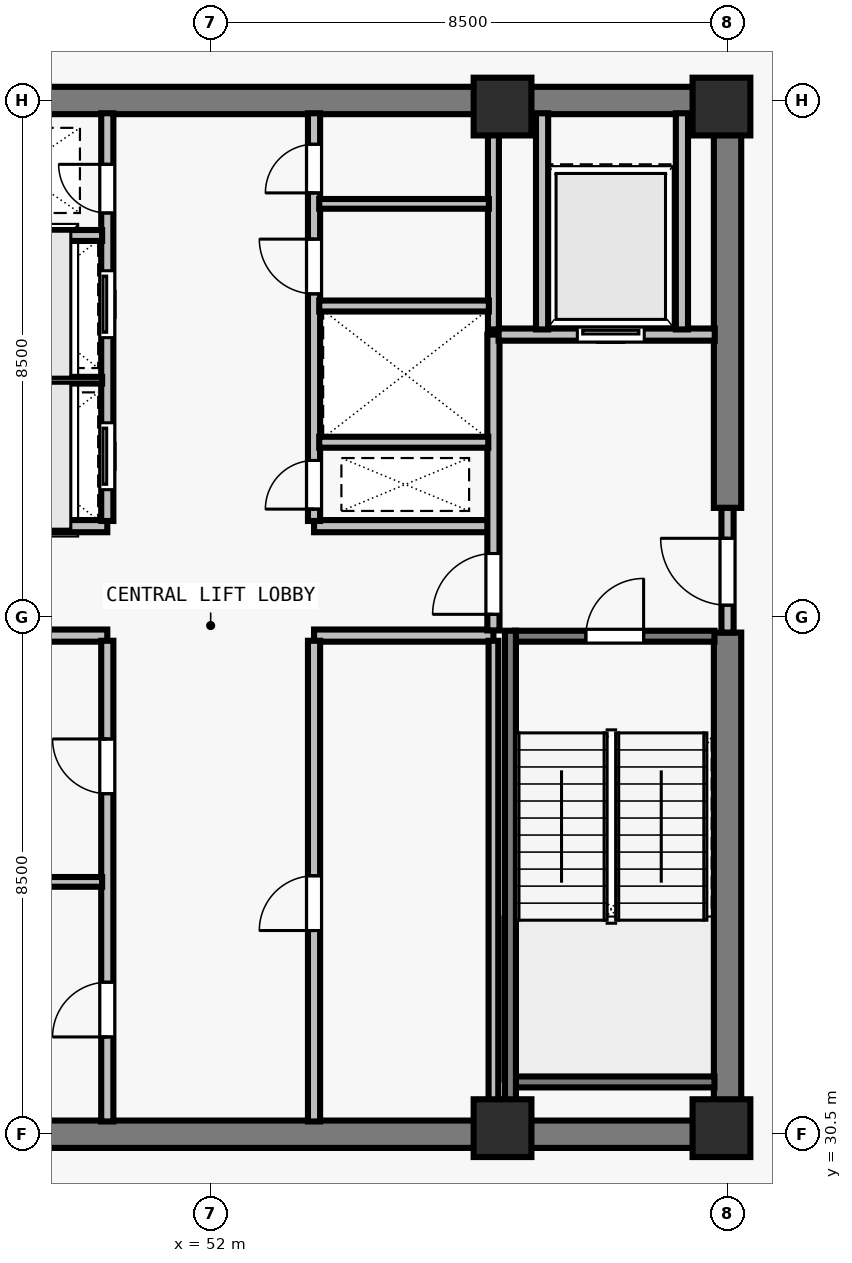
"""IFC4 building model, lengths in metres.
Left out: names, types, materials, properties, quantities, classifications, styles, units other than length and angle.
Written with IfcOpenShell. Run it as: python <this file> out.ifc"""

import sys

from ifc_helpers import new_model, si_unit, direction, frame, frame_2d, origin, origin_2d, place, context, subcontext, project, spatial, rectangle, extrude, element, fill, save


model = new_model("IFC4")
c1 = context("Model", 3, precision=1e-05, world=origin(), true_north=direction((0.0, 1.0)))
c2 = subcontext(c1, "Body", "Model", "MODEL_VIEW")
j1 = project(units=[si_unit("LENGTHUNIT", "METRE"), si_unit("PLANEANGLEUNIT", "RADIAN")], contexts=[c1])
p1 = place(None, origin())
s1 = spatial("IfcSite", under=j1, at=p1, CompositionType="ELEMENT")
p2 = place(p1, origin())
s2 = spatial("IfcBuilding", under=s1, at=p2, CompositionType="ELEMENT")
p3 = place(p2, frame((0.0, 0.0, 276.0)))
s3 = spatial("IfcBuildingStorey", under=s2, at=p3, CompositionType="ELEMENT", Elevation=276.0)
for number, where, z_axis, x_axis in (
    (1, (56.8, 30.6, 0.0), (0.0, 0.0, 1.0), (1.0, 0.0, 0.0)),
    (2, (60.4, 30.6, 0.0), (0.0, 0.0, 1.0), (1.0, 0.0, 0.0)),
    (3, (56.8, 47.4, 0.0), (0.0, 0.0, 1.0), (1.0, 0.0, 0.0)),
    (4, (60.4, 47.4, 0.0), (0.0, 0.0, 1.0), (1.0, 0.0, 0.0)),
):
    element("IfcColumn", number, at=place(p3, frame(where, z_axis=z_axis, x_axis=x_axis)), inside=s3, PredefinedType="COLUMN", context=c2, shape_type="SweptSolid", body=[
        extrude(rectangle(XDim=0.95, YDim=0.95, at=origin_2d()), origin(), (0.0, 0.0, 1.0), 4.5),
    ])
for number, where, z_axis, x_axis in (
    (5, (43.275, 30.5, 0.0), (0.0, 0.0, 1.0), (1.0, 0.0, 0.0)),
    (6, (43.275, 47.5, 0.0), (0.0, 0.0, 1.0), (1.0, 0.0, 0.0)),
):
    element("IfcWall", number, at=place(p3, frame(where, z_axis=z_axis, x_axis=x_axis)), inside=s3, PredefinedType="SHEAR", context=c2, shape_type="SweptSolid", body=[
        extrude(rectangle(XDim=17.45, YDim=0.45, at=frame_2d((8.725, 0.0))), origin(), (0.0, 0.0, 1.0), 4.29),
    ])
p4 = place(p3, frame((60.5, 30.715, 0.0), z_axis=(0.0, 0.0, 1.0), x_axis=(0.0, 1.0, 0.0)))
e7 = element("IfcWall", 7, at=p4, inside=s3, PredefinedType="SHEAR", context=c2, shape_type="SweptSolid", body=[
    extrude(rectangle(XDim=8.035, YDim=0.45, at=frame_2d((4.018, 0.0))), origin(), (0.0, 0.0, 1.0), 4.29),
])
p5 = place(p3, frame((60.5, 40.8, 0.0), z_axis=(0.0, 0.0, 1.0), x_axis=(0.0, 1.0, 0.0)))
e8 = element("IfcWall", 8, at=p5, inside=s3, PredefinedType="SHEAR", context=c2, shape_type="SweptSolid", body=[
    extrude(rectangle(XDim=6.485, YDim=0.45, at=frame_2d((3.242, 0.0))), origin(), (0.0, 0.0, 1.0), 4.29),
])
for number, where, z_axis, x_axis in (
    (9, (47.35, 38.7, 0.0), (0.0, 0.0, 1.0), (1.0, 0.0, 0.0)),
    (10, (47.35, 40.5, 0.0), (0.0, 0.0, 1.0), (1.0, 0.0, 0.0)),
    (11, (53.7, 38.7, 0.0), (0.0, 0.0, 1.0), (1.0, 0.0, 0.0)),
    (12, (53.7, 40.5, 0.0), (0.0, 0.0, 1.0), (1.0, 0.0, 0.0)),
):
    element("IfcWall", number, at=place(p3, frame(where, z_axis=z_axis, x_axis=x_axis)), inside=s3, PredefinedType="SOLIDWALL", context=c2, shape_type="SweptSolid", body=[
        extrude(rectangle(XDim=2.95, YDim=0.2, at=frame_2d((1.475, 0.0))), origin(), (0.0, 0.0, 1.0), 4.29),
    ])
p6 = place(p3, frame((50.3, 30.71, 0.0), z_axis=(0.0, 0.0, 1.0), x_axis=(0.0, 1.0, 0.0)))
e13 = element("IfcWall", 13, at=p6, inside=s3, PredefinedType="SOLIDWALL", context=c2, shape_type="SweptSolid", body=[
    extrude(rectangle(XDim=7.905, YDim=0.2, at=frame_2d((3.953, 0.0))), origin(), (0.0, 0.0, 1.0), 4.29),
])
p7 = place(p6, frame((1.39, 0.0, 0.0)))
e14 = element("IfcOpeningElement", 14, at=p7, cuts=e13, PredefinedType="OPENING", context=c2, shape_type="SweptSolid", body=[
    extrude(rectangle(XDim=0.9, YDim=2.12, at=frame_2d((0.45, 1.06))), frame((0.0, 0.11, 0.0), z_axis=(0.0, -1.0, 0.0), x_axis=(1.0, 0.0, 0.0)), (0.0, 0.0, 1.0), 0.22),
])
p8 = place(p6, frame((5.39, 0.0, 0.0)))
e15 = element("IfcOpeningElement", 15, at=p8, cuts=e13, PredefinedType="OPENING", context=c2, shape_type="SweptSolid", body=[
    extrude(rectangle(XDim=0.9, YDim=2.12, at=frame_2d((0.45, 1.06))), frame((0.0, 0.11, 0.0), z_axis=(0.0, -1.0, 0.0), x_axis=(1.0, 0.0, 0.0)), (0.0, 0.0, 1.0), 0.22),
])
p9 = place(p3, frame((53.7, 30.71, 0.0), z_axis=(0.0, 0.0, 1.0), x_axis=(0.0, 1.0, 0.0)))
e16 = element("IfcWall", 16, at=p9, inside=s3, PredefinedType="SOLIDWALL", context=c2, shape_type="SweptSolid", body=[
    extrude(rectangle(XDim=7.905, YDim=0.2, at=frame_2d((3.953, 0.0))), origin(), (0.0, 0.0, 1.0), 4.29),
])
p10 = place(p9, frame((3.14, 0.0, 0.0)))
e17 = element("IfcOpeningElement", 17, at=p10, cuts=e16, PredefinedType="OPENING", context=c2, shape_type="SweptSolid", body=[
    extrude(rectangle(XDim=0.9, YDim=2.12, at=frame_2d((0.45, 1.06))), frame((0.0, 0.11, 0.0), z_axis=(0.0, -1.0, 0.0), x_axis=(1.0, 0.0, 0.0)), (0.0, 0.0, 1.0), 0.22),
])
p11 = place(p3, frame((50.3, 40.585, 0.0), z_axis=(0.0, 0.0, 1.0), x_axis=(0.0, 1.0, 0.0)))
e18 = element("IfcWall", 18, at=p11, inside=s3, PredefinedType="SOLIDWALL", context=c2, shape_type="SweptSolid", body=[
    extrude(rectangle(XDim=6.705, YDim=0.2, at=frame_2d((3.353, 0.0))), origin(), (0.0, 0.0, 1.0), 4.29),
])
p12 = place(p11, frame((0.515, 0.0, 0.0)))
e19 = element("IfcOpeningElement", 19, at=p12, cuts=e18, PredefinedType="OPENING", context=c2, shape_type="SweptSolid", body=[
    extrude(rectangle(XDim=1.1, YDim=2.2, at=frame_2d((0.55, 1.1))), frame((0.0, 0.11, 0.0), z_axis=(0.0, -1.0, 0.0), x_axis=(1.0, 0.0, 0.0)), (0.0, 0.0, 1.0), 0.22),
])
p13 = place(p11, frame((3.015, 0.0, 0.0)))
e20 = element("IfcOpeningElement", 20, at=p13, cuts=e18, PredefinedType="OPENING", context=c2, shape_type="SweptSolid", body=[
    extrude(rectangle(XDim=1.1, YDim=2.2, at=frame_2d((0.55, 1.1))), frame((0.0, 0.11, 0.0), z_axis=(0.0, -1.0, 0.0), x_axis=(1.0, 0.0, 0.0)), (0.0, 0.0, 1.0), 0.22),
])
p14 = place(p11, frame((5.065, 0.0, 0.0)))
e21 = element("IfcOpeningElement", 21, at=p14, cuts=e18, PredefinedType="OPENING", context=c2, shape_type="SweptSolid", body=[
    extrude(rectangle(XDim=0.8, YDim=2.08, at=frame_2d((0.4, 1.04))), frame((0.0, 0.11, 0.0), z_axis=(0.0, -1.0, 0.0), x_axis=(1.0, 0.0, 0.0)), (0.0, 0.0, 1.0), 0.22),
])
p15 = place(p3, frame((53.7, 40.585, 0.0), z_axis=(0.0, 0.0, 1.0), x_axis=(0.0, 1.0, 0.0)))
e22 = element("IfcWall", 22, at=p15, inside=s3, PredefinedType="SOLIDWALL", context=c2, shape_type="SweptSolid", body=[
    extrude(rectangle(XDim=6.705, YDim=0.2, at=frame_2d((3.353, 0.0))), origin(), (0.0, 0.0, 1.0), 4.29),
])
p16 = place(p15, frame((0.195, 0.0, 0.0)))
e23 = element("IfcOpeningElement", 23, at=p16, cuts=e22, PredefinedType="OPENING", context=c2, shape_type="SweptSolid", body=[
    extrude(rectangle(XDim=0.8, YDim=2.08, at=frame_2d((0.4, 1.04))), frame((0.0, 0.11, 0.0), z_axis=(0.0, -1.0, 0.0), x_axis=(1.0, 0.0, 0.0)), (0.0, 0.0, 1.0), 0.22),
])
p17 = place(p15, frame((3.735, 0.0, 0.0)))
e24 = element("IfcOpeningElement", 24, at=p17, cuts=e22, PredefinedType="OPENING", context=c2, shape_type="SweptSolid", body=[
    extrude(rectangle(XDim=0.9, YDim=2.12, at=frame_2d((0.45, 1.06))), frame((0.0, 0.11, 0.0), z_axis=(0.0, -1.0, 0.0), x_axis=(1.0, 0.0, 0.0)), (0.0, 0.0, 1.0), 0.22),
])
p18 = place(p15, frame((5.395, 0.0, 0.0)))
e25 = element("IfcOpeningElement", 25, at=p18, cuts=e22, PredefinedType="OPENING", context=c2, shape_type="SweptSolid", body=[
    extrude(rectangle(XDim=0.8, YDim=2.1, at=frame_2d((0.4, 1.05))), frame((0.0, 0.11, 0.0), z_axis=(0.0, -1.0, 0.0), x_axis=(1.0, 0.0, 0.0)), (0.0, 0.0, 1.0), 0.22),
])
p19 = place(p3, frame((60.5, 38.75, 0.0), z_axis=(0.0, 0.0, 1.0), x_axis=(0.0, 1.0, 0.0)))
e26 = element("IfcWall", 26, at=p19, inside=s3, PredefinedType="SOLIDWALL", context=c2, shape_type="SweptSolid", body=[
    extrude(rectangle(XDim=2.05, YDim=0.2, at=frame_2d((1.025, 0.0))), origin(), (0.0, 0.0, 1.0), 4.29),
])
p20 = place(p19, frame((0.45, 0.0, 0.0)))
e27 = element("IfcOpeningElement", 27, at=p20, cuts=e26, PredefinedType="OPENING", context=c2, shape_type="SweptSolid", body=[
    extrude(rectangle(XDim=1.1, YDim=2.15, at=frame_2d((0.55, 1.075))), frame((0.0, 0.11, 0.0), z_axis=(0.0, -1.0, 0.0), x_axis=(1.0, 0.0, 0.0)), (0.0, 0.0, 1.0), 0.22),
])
p21 = place(p3, frame((56.65, 38.785, 0.0), z_axis=(0.0, 0.0, 1.0), x_axis=(0.0, 1.0, 0.0)))
e28 = element("IfcWall", 28, at=p21, inside=s3, PredefinedType="SOLIDWALL", context=c2, shape_type="SweptSolid", body=[
    extrude(rectangle(XDim=4.865, YDim=0.2, at=frame_2d((2.433, 0.0))), origin(), (0.0, 0.0, 1.0), 4.29),
])
p22 = place(p21, frame((0.265, 0.0, 0.0)))
e29 = element("IfcOpeningElement", 29, at=p22, cuts=e28, PredefinedType="OPENING", context=c2, shape_type="SweptSolid", body=[
    extrude(rectangle(XDim=1.0, YDim=2.15, at=frame_2d((0.5, 1.075))), frame((0.0, 0.11, 0.0), z_axis=(0.0, -1.0, 0.0), x_axis=(1.0, 0.0, 0.0)), (0.0, 0.0, 1.0), 0.22),
])
p23 = place(p3, frame((56.735, 43.65, 0.0), z_axis=(0.0, 0.0, 1.0), x_axis=(1.0, 0.0, 0.0)))
e30 = element("IfcWall", 30, at=p23, inside=s3, PredefinedType="SOLIDWALL", context=c2, shape_type="SweptSolid", body=[
    extrude(rectangle(XDim=3.555, YDim=0.2, at=frame_2d((1.777, 0.0))), origin(), (0.0, 0.0, 1.0), 4.29),
])
p24 = place(p23, frame((1.295, 0.0, 0.0)))
e31 = element("IfcOpeningElement", 31, at=p24, cuts=e30, PredefinedType="OPENING", context=c2, shape_type="SweptSolid", body=[
    extrude(rectangle(XDim=1.1, YDim=2.2, at=frame_2d((0.55, 1.1))), frame((0.0, 0.11, 0.0), z_axis=(0.0, -1.0, 0.0), x_axis=(1.0, 0.0, 0.0)), (0.0, 0.0, 1.0), 0.22),
])
for number, where, z_axis, x_axis in (
    (32, (57.45, 43.735, 0.0), (0.0, 0.0, 1.0), (0.0, 1.0, 0.0)),
    (33, (59.75, 43.735, 0.0), (0.0, 0.0, 1.0), (0.0, 1.0, 0.0)),
):
    element("IfcWall", number, at=place(p3, frame(where, z_axis=z_axis, x_axis=x_axis)), inside=s3, PredefinedType="SOLIDWALL", context=c2, shape_type="SweptSolid", body=[
        extrude(rectangle(XDim=3.555, YDim=0.2, at=frame_2d((1.777, 0.0))), origin(), (0.0, 0.0, 1.0), 4.29),
    ])
p25 = place(p3, frame((47.415, 34.65, 0.0), z_axis=(0.0, 0.0, 1.0), x_axis=(1.0, 0.0, 0.0)))
e34 = element("IfcWall", 34, at=p25, inside=s3, PredefinedType="PARTITIONING", context=c2, shape_type="SweptSolid", body=[
    extrude(rectangle(XDim=2.8, YDim=0.16, at=frame_2d((1.4, 0.0))), origin(), (0.0, 0.0, 1.0), 4.29),
])
p26 = place(p3, frame((56.65, 30.71, 0.0), z_axis=(0.0, 0.0, 1.0), x_axis=(0.0, 1.0, 0.0)))
e35 = element("IfcWall", 35, at=p26, inside=s3, PredefinedType="PARTITIONING", context=c2, shape_type="SweptSolid", body=[
    extrude(rectangle(XDim=7.905, YDim=0.16, at=frame_2d((3.953, 0.0))), origin(), (0.0, 0.0, 1.0), 4.29),
])
p27 = place(p3, frame((47.435, 42.9, 0.0), z_axis=(0.0, 0.0, 1.0), x_axis=(1.0, 0.0, 0.0)))
e36 = element("IfcWall", 36, at=p27, inside=s3, PredefinedType="PARTITIONING", context=c2, shape_type="SweptSolid", body=[
    extrude(rectangle(XDim=2.78, YDim=0.11, at=frame_2d((1.39, 0.0))), origin(), (0.0, 0.0, 1.0), 4.29),
])
p28 = place(p3, frame((47.425, 45.28, 0.0), z_axis=(0.0, 0.0, 1.0), x_axis=(1.0, 0.0, 0.0)))
e37 = element("IfcWall", 37, at=p28, inside=s3, PredefinedType="SOLIDWALL", context=c2, shape_type="SweptSolid", body=[
    extrude(rectangle(XDim=2.79, YDim=0.18, at=frame_2d((1.395, 0.0))), origin(), (0.0, 0.0, 1.0), 4.29),
])
p29 = place(p3, frame((56.65, 43.735, 0.0), z_axis=(0.0, 0.0, 1.0), x_axis=(0.0, 1.0, 0.0)))
e38 = element("IfcWall", 38, at=p29, inside=s3, PredefinedType="SOLIDWALL", context=c2, shape_type="SweptSolid", body=[
    extrude(rectangle(XDim=3.555, YDim=0.18, at=frame_2d((1.777, 0.0))), origin(), (0.0, 0.0, 1.0), 4.29),
])
p30 = place(p3, frame((53.785, 41.88, 0.0), z_axis=(0.0, 0.0, 1.0), x_axis=(1.0, 0.0, 0.0)))
e39 = element("IfcWall", 39, at=p30, inside=s3, PredefinedType="SOLIDWALL", context=c2, shape_type="SweptSolid", body=[
    extrude(rectangle(XDim=2.78, YDim=0.18, at=frame_2d((1.39, 0.0))), origin(), (0.0, 0.0, 1.0), 4.29),
])
p31 = place(p3, frame((53.785, 44.12, 0.0), z_axis=(0.0, 0.0, 1.0), x_axis=(1.0, 0.0, 0.0)))
e40 = element("IfcWall", 40, at=p31, inside=s3, PredefinedType="SOLIDWALL", context=c2, shape_type="SweptSolid", body=[
    extrude(rectangle(XDim=2.79, YDim=0.18, at=frame_2d((1.395, 0.0))), origin(), (0.0, 0.0, 1.0), 4.29),
])
p32 = place(p3, frame((53.785, 45.8, 0.0), z_axis=(0.0, 0.0, 1.0), x_axis=(1.0, 0.0, 0.0)))
e41 = element("IfcWall", 41, at=p32, inside=s3, PredefinedType="PARTITIONING", context=c2, shape_type="SweptSolid", body=[
    extrude(rectangle(XDim=2.79, YDim=0.16, at=frame_2d((1.395, 0.0))), origin(), (0.0, 0.0, 1.0), 4.29),
])
p33 = place(p3, frame((57.005, 38.69, 0.0), z_axis=(0.0, 0.0, 1.0), x_axis=(1.0, 0.0, 0.0)))
e42 = element("IfcWall", 42, at=p33, inside=s3, PredefinedType="SOLIDWALL", context=c2, shape_type="SweptSolid", body=[
    extrude(rectangle(XDim=3.28, YDim=0.18, at=frame_2d((1.64, 0.0))), origin(), (0.0, 0.0, 1.0), 4.29),
])
p34 = place(p33, frame((1.165, 0.0, 0.0)))
e43 = element("IfcOpeningElement", 43, at=p34, cuts=e42, PredefinedType="OPENING", context=c2, shape_type="SweptSolid", body=[
    extrude(rectangle(XDim=0.95, YDim=2.15, at=frame_2d((0.475, 1.075))), frame((0.0, 0.1, 0.0), z_axis=(0.0, -1.0, 0.0), x_axis=(1.0, 0.0, 0.0)), (0.0, 0.0, 1.0), 0.2),
])
p35 = place(p3, frame((57.005, 31.36, 0.0), z_axis=(0.0, 0.0, 1.0), x_axis=(1.0, 0.0, 0.0)))
e44 = element("IfcWall", 44, at=p35, inside=s3, PredefinedType="SOLIDWALL", context=c2, shape_type="SweptSolid", body=[
    extrude(rectangle(XDim=3.28, YDim=0.18, at=frame_2d((1.64, 0.0))), origin(), (0.0, 0.0, 1.0), 4.29),
])
p36 = place(p3, frame((56.93, 38.78, 0.0), z_axis=(0.0, 0.0, 1.0), x_axis=(0.0, -1.0, 0.0)))
e45 = element("IfcWall", 45, at=p36, inside=s3, PredefinedType="SOLIDWALL", context=c2, shape_type="SweptSolid", body=[
    extrude(rectangle(XDim=8.067, YDim=0.18, at=frame_2d((4.034, 0.0))), origin(), (0.0, 0.0, 1.0), 4.29),
])
p37 = place(p20, origin())
e46 = element("IfcDoor", 46, at=p37, inside=s3, OperationType="SINGLE_SWING_RIGHT", PredefinedType="DOOR", context=c2, shape_type="SweptSolid", body=[
    extrude(rectangle(XDim=1.1, YDim=2.15, at=frame_2d((0.55, 1.075))), frame((0.0, 0.025, 0.0), z_axis=(0.0, -1.0, 0.0), x_axis=(1.0, 0.0, 0.0)), (0.0, 0.0, 1.0), 0.05),
])
fill(e27, e46)
p38 = place(p22, origin())
e47 = element("IfcDoor", 47, at=p38, inside=s3, OperationType="SINGLE_SWING_LEFT", PredefinedType="DOOR", context=c2, shape_type="SweptSolid", body=[
    extrude(rectangle(XDim=1.0, YDim=2.15, at=frame_2d((0.5, 1.075))), frame((0.0, 0.025, 0.0), z_axis=(0.0, -1.0, 0.0), x_axis=(1.0, 0.0, 0.0)), (0.0, 0.0, 1.0), 0.05),
])
fill(e29, e47)
p39 = place(p24, origin())
e48 = element("IfcDoor", 48, at=p39, inside=s3, OperationType="SLIDING_TO_LEFT", PredefinedType="DOOR", context=c2, shape_type="SweptSolid", body=[
    extrude(rectangle(XDim=1.1, YDim=2.2, at=frame_2d((0.55, 1.1))), frame((0.0, 0.025, 0.0), z_axis=(0.0, -1.0, 0.0), x_axis=(1.0, 0.0, 0.0)), (0.0, 0.0, 1.0), 0.05),
])
fill(e31, e48)
p40 = place(p7, origin())
e49 = element("IfcDoor", 49, at=p40, inside=s3, OperationType="SINGLE_SWING_LEFT", PredefinedType="DOOR", context=c2, shape_type="SweptSolid", body=[
    extrude(rectangle(XDim=0.9, YDim=2.12, at=frame_2d((0.45, 1.06))), frame((0.0, 0.025, 0.0), z_axis=(0.0, -1.0, 0.0), x_axis=(1.0, 0.0, 0.0)), (0.0, 0.0, 1.0), 0.05),
])
fill(e14, e49)
p41 = place(p8, origin())
e50 = element("IfcDoor", 50, at=p41, inside=s3, OperationType="SINGLE_SWING_RIGHT", PredefinedType="DOOR", context=c2, shape_type="SweptSolid", body=[
    extrude(rectangle(XDim=0.9, YDim=2.12, at=frame_2d((0.45, 1.06))), frame((0.0, 0.025, 0.0), z_axis=(0.0, -1.0, 0.0), x_axis=(1.0, 0.0, 0.0)), (0.0, 0.0, 1.0), 0.05),
])
fill(e15, e50)
p42 = place(p10, origin())
e51 = element("IfcDoor", 51, at=p42, inside=s3, OperationType="SINGLE_SWING_LEFT", PredefinedType="DOOR", context=c2, shape_type="SweptSolid", body=[
    extrude(rectangle(XDim=0.9, YDim=2.12, at=frame_2d((0.45, 1.06))), frame((0.0, 0.025, 0.0), z_axis=(0.0, -1.0, 0.0), x_axis=(1.0, 0.0, 0.0)), (0.0, 0.0, 1.0), 0.05),
])
fill(e17, e51)
p43 = place(p12, origin())
e52 = element("IfcDoor", 52, at=p43, inside=s3, OperationType="SLIDING_TO_LEFT", PredefinedType="DOOR", context=c2, shape_type="SweptSolid", body=[
    extrude(rectangle(XDim=1.1, YDim=2.2, at=frame_2d((0.55, 1.1))), frame((0.0, 0.025, 0.0), z_axis=(0.0, -1.0, 0.0), x_axis=(1.0, 0.0, 0.0)), (0.0, 0.0, 1.0), 0.05),
])
fill(e19, e52)
p44 = place(p13, origin())
e53 = element("IfcDoor", 53, at=p44, inside=s3, OperationType="SLIDING_TO_LEFT", PredefinedType="DOOR", context=c2, shape_type="SweptSolid", body=[
    extrude(rectangle(XDim=1.1, YDim=2.2, at=frame_2d((0.55, 1.1))), frame((0.0, 0.025, 0.0), z_axis=(0.0, -1.0, 0.0), x_axis=(1.0, 0.0, 0.0)), (0.0, 0.0, 1.0), 0.05),
])
fill(e20, e53)
p45 = place(p14, origin())
e54 = element("IfcDoor", 54, at=p45, inside=s3, OperationType="SINGLE_SWING_RIGHT", PredefinedType="DOOR", context=c2, shape_type="SweptSolid", body=[
    extrude(rectangle(XDim=0.8, YDim=2.08, at=frame_2d((0.4, 1.04))), frame((0.0, 0.025, 0.0), z_axis=(0.0, -1.0, 0.0), x_axis=(1.0, 0.0, 0.0)), (0.0, 0.0, 1.0), 0.05),
])
fill(e21, e54)
p46 = place(p16, origin())
e55 = element("IfcDoor", 55, at=p46, inside=s3, OperationType="SINGLE_SWING_LEFT", PredefinedType="DOOR", context=c2, shape_type="SweptSolid", body=[
    extrude(rectangle(XDim=0.8, YDim=2.08, at=frame_2d((0.4, 1.04))), frame((0.0, 0.025, 0.0), z_axis=(0.0, -1.0, 0.0), x_axis=(1.0, 0.0, 0.0)), (0.0, 0.0, 1.0), 0.05),
])
fill(e23, e55)
p47 = place(p17, origin())
e56 = element("IfcDoor", 56, at=p47, inside=s3, OperationType="SINGLE_SWING_RIGHT", PredefinedType="DOOR", context=c2, shape_type="SweptSolid", body=[
    extrude(rectangle(XDim=0.9, YDim=2.12, at=frame_2d((0.45, 1.06))), frame((0.0, 0.025, 0.0), z_axis=(0.0, -1.0, 0.0), x_axis=(1.0, 0.0, 0.0)), (0.0, 0.0, 1.0), 0.05),
])
fill(e24, e56)
p48 = place(p18, origin())
e57 = element("IfcDoor", 57, at=p48, inside=s3, OperationType="SINGLE_SWING_LEFT", PredefinedType="DOOR", context=c2, shape_type="SweptSolid", body=[
    extrude(rectangle(XDim=0.8, YDim=2.1, at=frame_2d((0.4, 1.05))), frame((0.0, 0.025, 0.0), z_axis=(0.0, -1.0, 0.0), x_axis=(1.0, 0.0, 0.0)), (0.0, 0.0, 1.0), 0.05),
])
fill(e25, e57)
p49 = place(p34, origin())
e58 = element("IfcDoor", 58, at=p49, inside=s3, OperationType="SINGLE_SWING_RIGHT", PredefinedType="DOOR", context=c2, shape_type="SweptSolid", body=[
    extrude(rectangle(XDim=0.95, YDim=2.15, at=frame_2d((0.475, 1.075))), frame((0.0, 0.025, 0.0), z_axis=(0.0, -1.0, 0.0), x_axis=(1.0, 0.0, 0.0)), (0.0, 0.0, 1.0), 0.05),
])
fill(e43, e58)
save(model, sys.argv[1])
